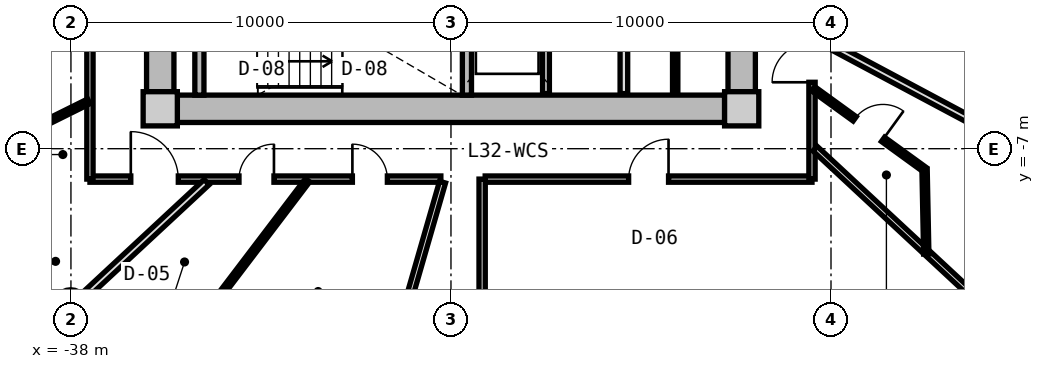
"""IFC4 building model, lengths in metres.
Left out: names, types, materials, properties, quantities, classifications, styles, units other than length and angle.
Written with IfcOpenShell. Run it as: python <this file> out.ifc"""

import sys

from ifc_helpers import new_model, si_unit, direction, frame, frame_2d, origin, origin_2d, place, context, subcontext, project, spatial, rectangle, extrude, source, transform, mapped, element, fill, save


model = new_model("IFC4")
c1 = context("Model", 3, precision=1e-05, world=origin(), true_north=direction((0.0, 1.0)))
c2 = subcontext(c1, "Body", "Model", "MODEL_VIEW")
j1 = project(units=[si_unit("LENGTHUNIT", "METRE"), si_unit("PLANEANGLEUNIT", "RADIAN")], contexts=[c1])
p1 = place(None, origin())
s1 = spatial("IfcSite", under=j1, at=p1, CompositionType="ELEMENT")
p2 = place(p1, origin())
s2 = spatial("IfcBuilding", under=s1, at=p2, CompositionType="ELEMENT")
p3 = place(p2, frame((0.0, 0.0, 105.4)))
s3 = spatial("IfcBuildingStorey", under=s2, at=p3, CompositionType="ELEMENT", Elevation=105.4)
m1 = source(origin(), c2, "Body", "SweptSolid", [
    extrude(rectangle(XDim=0.9, YDim=0.9, at=origin_2d()), origin(), (0.0, 0.0, 1.0), 3.05),
])
for number, where, z_axis, x_axis in (
    (1, (-35.65, -5.95, 0.0), (0.0, 0.0, 1.0), (1.0, 0.0, 0.0)),
    (2, (-20.35, -5.95, 0.0), (0.0, 0.0, 1.0), (1.0, 0.0, 0.0)),
):
    element("IfcColumn", number, at=place(p3, frame(where, z_axis=z_axis, x_axis=x_axis)), inside=s3, PredefinedType="COLUMN", context=c2, shape_type="MappedRepresentation", body=[
        mapped(m1, transform((0.0, 0.0, 0.0), x_axis=(1.0, 0.0, 0.0), y_axis=(0.0, 1.0, 0.0), z_axis=(0.0, 0.0, 1.0), scale=1.0)),
    ])
m2 = source(origin(), c2, "Body", "SweptSolid", [
    extrude(rectangle(XDim=14.4, YDim=0.72, at=frame_2d((7.2, 0.0))), origin(), (0.0, 0.0, 1.0), 2.79),
])
p4 = place(p3, frame((-20.8, -5.95, 0.0), z_axis=(0.0, 0.0, 1.0), x_axis=(-1.0, 0.0, 0.0)))
e3 = element("IfcWall", 3, at=p4, inside=s3, PredefinedType="SHEAR", context=c2, shape_type="MappedRepresentation", body=[
    mapped(m2, transform((0.0, 0.0, 0.0), x_axis=(1.0, 0.0, 0.0), y_axis=(0.0, 1.0, 0.0), z_axis=(0.0, 0.0, 1.0), scale=1.0)),
])
m3 = source(origin(), c2, "Body", "SweptSolid", [
    extrude(rectangle(XDim=11.0, YDim=0.72, at=frame_2d((5.5, 0.0))), origin(), (0.0, 0.0, 1.0), 2.79),
])
p5 = place(p3, frame((-35.65, -5.5, 0.0), z_axis=(0.0, 0.0, 1.0), x_axis=(0.0, 1.0, 0.0)))
e4 = element("IfcWall", 4, at=p5, inside=s3, PredefinedType="SHEAR", context=c2, shape_type="MappedRepresentation", body=[
    mapped(m3, transform((0.0, 0.0, 0.0), x_axis=(1.0, 0.0, 0.0), y_axis=(0.0, 1.0, 0.0), z_axis=(0.0, 0.0, 1.0), scale=1.0)),
])
p6 = place(p5, frame((3.8, 0.0, 0.0)))
e5 = element("IfcOpeningElement", 5, at=p6, cuts=e4, PredefinedType="OPENING", context=c2, shape_type="SweptSolid", body=[
    extrude(rectangle(XDim=1.2, YDim=2.15, at=frame_2d((0.6, 1.075))), frame((0.0, 0.37, 0.0), z_axis=(0.0, -1.0, 0.0), x_axis=(1.0, 0.0, 0.0)), (0.0, 0.0, 1.0), 0.74),
])
p7 = place(p3, frame((-20.35, 5.5, 0.0), z_axis=(0.0, 0.0, 1.0), x_axis=(0.0, -1.0, 0.0)))
e6 = element("IfcWall", 6, at=p7, inside=s3, PredefinedType="SHEAR", context=c2, shape_type="MappedRepresentation", body=[
    mapped(m3, transform((0.0, 0.0, 0.0), x_axis=(1.0, 0.0, 0.0), y_axis=(0.0, 1.0, 0.0), z_axis=(0.0, 0.0, 1.0), scale=1.0)),
])
p8 = place(p7, frame((5.65, 0.0, 0.0)))
e7 = element("IfcOpeningElement", 7, at=p8, cuts=e6, PredefinedType="OPENING", context=c2, shape_type="SweptSolid", body=[
    extrude(rectangle(XDim=1.2, YDim=2.15, at=frame_2d((0.6, 1.075))), frame((0.0, 0.37, 0.0), z_axis=(0.0, -1.0, 0.0), x_axis=(1.0, 0.0, 0.0)), (0.0, 0.0, 1.0), 0.74),
])
m4 = source(origin(), c2, "Body", "SweptSolid", [
    extrude(rectangle(XDim=3.14, YDim=0.24, at=frame_2d((1.57, 0.0))), origin(), (0.0, 0.0, 1.0), 2.79),
])
for number, where, z_axis, x_axis in (
    (8, (-34.62, -5.59, 0.0), (0.0, 0.0, 1.0), (0.0, 1.0, 0.0)),
    (9, (-27.58, -5.59, 0.0), (0.0, 0.0, 1.0), (0.0, 1.0, 0.0)),
):
    element("IfcWall", number, at=place(p3, frame(where, z_axis=z_axis, x_axis=x_axis)), inside=s3, PredefinedType="PARTITIONING", context=c2, shape_type="MappedRepresentation", body=[
        mapped(m4, transform((0.0, 0.0, 0.0), x_axis=(1.0, 0.0, 0.0), y_axis=(0.0, 1.0, 0.0), z_axis=(0.0, 0.0, 1.0), scale=1.0)),
    ])
m5 = source(origin(), c2, "Body", "SweptSolid", [
    extrude(rectangle(XDim=3.8, YDim=0.2, at=frame_2d((1.9, 0.0))), origin(), (0.0, 0.0, 1.0), 2.775),
])
p9 = place(p3, frame((-23.45, -5.55, 0.0), z_axis=(0.0, 0.0, 1.0), x_axis=(0.0, 1.0, 0.0)))
e10 = element("IfcWall", 10, at=p9, inside=s3, PredefinedType="PARTITIONING", context=c2, shape_type="MappedRepresentation", body=[
    mapped(m5, transform((0.0, 0.0, 0.0), x_axis=(1.0, 0.0, 0.0), y_axis=(0.0, 1.0, 0.0), z_axis=(0.0, 0.0, 1.0), scale=1.0)),
])
m6 = source(origin(), c2, "Body", "SweptSolid", [
    extrude(rectangle(XDim=3.22, YDim=0.18, at=frame_2d((1.61, 0.0))), origin(), (0.0, 0.0, 1.0), 2.775),
])
p10 = place(p3, frame((-25.5, -5.55, 0.0), z_axis=(0.0, 0.0, 1.0), x_axis=(0.0, 1.0, 0.0)))
e11 = element("IfcWall", 11, at=p10, inside=s3, PredefinedType="PARTITIONING", context=c2, shape_type="MappedRepresentation", body=[
    mapped(m6, transform((0.0, 0.0, 0.0), x_axis=(1.0, 0.0, 0.0), y_axis=(0.0, 1.0, 0.0), z_axis=(0.0, 0.0, 1.0), scale=1.0)),
])
m7 = source(origin(), c2, "Body", "SweptSolid", [
    extrude(rectangle(XDim=3.8, YDim=0.14, at=frame_2d((1.9, 0.0))), origin(), (0.0, 0.0, 1.0), 2.775),
])
p11 = place(p3, frame((-22.1, -5.55, 0.0), z_axis=(0.0, 0.0, 1.0), x_axis=(0.0, 1.0, 0.0)))
e12 = element("IfcWall", 12, at=p11, inside=s3, PredefinedType="PARTITIONING", context=c2, shape_type="MappedRepresentation", body=[
    mapped(m7, transform((0.0, 0.0, 0.0), x_axis=(1.0, 0.0, 0.0), y_axis=(0.0, 1.0, 0.0), z_axis=(0.0, 0.0, 1.0), scale=1.0)),
])
m8 = source(origin(), c2, "Body", "SweptSolid", [
    extrude(rectangle(XDim=8.6, YDim=0.165, at=frame_2d((4.3, 0.0))), origin(), (0.0, 0.0, 1.0), 2.775),
])
p12 = place(p3, frame((-18.5, -7.8, 0.0), z_axis=(0.0, 0.0, 1.0), x_axis=(-1.0, 0.0, 0.0)))
e13 = element("IfcWall", 13, at=p12, inside=s3, PredefinedType="PARTITIONING", context=c2, shape_type="MappedRepresentation", body=[
    mapped(m8, transform((0.0, 0.0, 0.0), x_axis=(1.0, 0.0, 0.0), y_axis=(0.0, 1.0, 0.0), z_axis=(0.0, 0.0, 1.0), scale=1.0)),
])
p13 = place(p12, frame((3.775, 0.0, 0.0)))
e14 = element("IfcOpeningElement", 14, at=p13, cuts=e13, PredefinedType="OPENING", context=c2, shape_type="SweptSolid", body=[
    extrude(rectangle(XDim=1.05, YDim=2.15, at=frame_2d((0.525, 1.075))), frame((0.0, 0.093, 0.0), z_axis=(0.0, -1.0, 0.0), x_axis=(1.0, 0.0, 0.0)), (0.0, 0.0, 1.0), 0.185),
])
m9 = source(origin(), c2, "Body", "SweptSolid", [
    extrude(rectangle(XDim=9.234, YDim=0.165, at=frame_2d((4.617, 0.0))), origin(), (0.0, 0.0, 1.0), 2.775),
])
p14 = place(p3, frame((-28.266, -7.8, 0.0), z_axis=(0.0, 0.0, 1.0), x_axis=(-1.0, 0.0, 0.0)))
e15 = element("IfcWall", 15, at=p14, inside=s3, PredefinedType="PARTITIONING", context=c2, shape_type="MappedRepresentation", body=[
    mapped(m9, transform((0.0, 0.0, 0.0), x_axis=(1.0, 0.0, 0.0), y_axis=(0.0, 1.0, 0.0), z_axis=(0.0, 0.0, 1.0), scale=1.0)),
])
p15 = place(p14, frame((6.909, 0.0, 0.0)))
e16 = element("IfcOpeningElement", 16, at=p15, cuts=e15, PredefinedType="OPENING", context=c2, shape_type="SweptSolid", body=[
    extrude(rectangle(XDim=1.25, YDim=2.2, at=frame_2d((0.625, 1.1))), frame((0.0, 0.093, 0.0), z_axis=(0.0, -1.0, 0.0), x_axis=(1.0, 0.0, 0.0)), (0.0, 0.0, 1.0), 0.185),
])
p16 = place(p14, frame((4.392, 0.0, 0.0)))
e17 = element("IfcOpeningElement", 17, at=p16, cuts=e15, PredefinedType="OPENING", context=c2, shape_type="SweptSolid", body=[
    extrude(rectangle(XDim=0.92, YDim=2.1, at=frame_2d((0.46, 1.05))), frame((0.0, 0.093, 0.0), z_axis=(0.0, -1.0, 0.0), x_axis=(1.0, 0.0, 0.0)), (0.0, 0.0, 1.0), 0.185),
])
p17 = place(p14, frame((1.408, 0.0, 0.0)))
e18 = element("IfcOpeningElement", 18, at=p17, cuts=e15, PredefinedType="OPENING", context=c2, shape_type="SweptSolid", body=[
    extrude(rectangle(XDim=0.92, YDim=2.1, at=frame_2d((0.46, 1.05))), frame((0.0, 0.093, 0.0), z_axis=(0.0, -1.0, 0.0), x_axis=(1.0, 0.0, 0.0)), (0.0, 0.0, 1.0), 0.185),
])
m10 = source(origin(), c2, "Body", "SweptSolid", [
    extrude(rectangle(XDim=15.6, YDim=0.165, at=frame_2d((7.8, 0.0))), origin(), (0.0, 0.0, 1.0), 2.775),
])
p18 = place(p3, frame((-37.5, -7.8, 0.0), z_axis=(0.0, 0.0, 1.0), x_axis=(0.0, 1.0, 0.0)))
e19 = element("IfcWall", 19, at=p18, inside=s3, PredefinedType="PARTITIONING", context=c2, shape_type="MappedRepresentation", body=[
    mapped(m10, transform((0.0, 0.0, 0.0), x_axis=(1.0, 0.0, 0.0), y_axis=(0.0, 1.0, 0.0), z_axis=(0.0, 0.0, 1.0), scale=1.0)),
])
p19 = place(p18, frame((11.994, 0.0, 0.0)))
e20 = element("IfcOpeningElement", 20, at=p19, cuts=e19, PredefinedType="OPENING", context=c2, shape_type="SweptSolid", body=[
    extrude(rectangle(XDim=1.25, YDim=2.2, at=frame_2d((0.625, 1.1))), frame((0.0, 0.093, 0.0), z_axis=(0.0, -1.0, 0.0), x_axis=(1.0, 0.0, 0.0)), (0.0, 0.0, 1.0), 0.185),
])
p20 = place(p18, frame((7.984, 0.0, 0.0)))
e21 = element("IfcOpeningElement", 21, at=p20, cuts=e19, PredefinedType="OPENING", context=c2, shape_type="SweptSolid", body=[
    extrude(rectangle(XDim=1.05, YDim=2.15, at=frame_2d((0.525, 1.075))), frame((0.0, 0.093, 0.0), z_axis=(0.0, -1.0, 0.0), x_axis=(1.0, 0.0, 0.0)), (0.0, 0.0, 1.0), 0.185),
])
p21 = place(p18, frame((5.777, 0.0, 0.0)))
e22 = element("IfcOpeningElement", 22, at=p21, cuts=e19, PredefinedType="OPENING", context=c2, shape_type="SweptSolid", body=[
    extrude(rectangle(XDim=1.05, YDim=2.15, at=frame_2d((0.525, 1.075))), frame((0.0, 0.093, 0.0), z_axis=(0.0, -1.0, 0.0), x_axis=(1.0, 0.0, 0.0)), (0.0, 0.0, 1.0), 0.185),
])
p22 = place(p3, frame((-18.5, 7.8, 0.0), z_axis=(0.0, 0.0, 1.0), x_axis=(0.0, -1.0, 0.0)))
e23 = element("IfcWall", 23, at=p22, inside=s3, PredefinedType="PARTITIONING", context=c2, shape_type="MappedRepresentation", body=[
    mapped(m10, transform((0.0, 0.0, 0.0), x_axis=(1.0, 0.0, 0.0), y_axis=(0.0, 1.0, 0.0), z_axis=(0.0, 0.0, 1.0), scale=1.0)),
])
p23 = place(p22, frame((12.002, 0.0, 0.0)))
e24 = element("IfcOpeningElement", 24, at=p23, cuts=e23, PredefinedType="OPENING", context=c2, shape_type="SweptSolid", body=[
    extrude(rectangle(XDim=1.05, YDim=2.15, at=frame_2d((0.525, 1.075))), frame((0.0, 0.093, 0.0), z_axis=(0.0, -1.0, 0.0), x_axis=(1.0, 0.0, 0.0)), (0.0, 0.0, 1.0), 0.185),
])
p24 = place(p22, frame((10.211, 0.0, 0.0)))
e25 = element("IfcOpeningElement", 25, at=p24, cuts=e23, PredefinedType="OPENING", context=c2, shape_type="SweptSolid", body=[
    extrude(rectangle(XDim=1.05, YDim=2.15, at=frame_2d((0.525, 1.075))), frame((0.0, 0.093, 0.0), z_axis=(0.0, -1.0, 0.0), x_axis=(1.0, 0.0, 0.0)), (0.0, 0.0, 1.0), 0.185),
])
p25 = place(p22, frame((7.722, 0.0, 0.0)))
e26 = element("IfcOpeningElement", 26, at=p25, cuts=e23, PredefinedType="OPENING", context=c2, shape_type="SweptSolid", body=[
    extrude(rectangle(XDim=1.05, YDim=2.15, at=frame_2d((0.525, 1.075))), frame((0.0, 0.093, 0.0), z_axis=(0.0, -1.0, 0.0), x_axis=(1.0, 0.0, 0.0)), (0.0, 0.0, 1.0), 0.185),
])
p26 = place(p22, frame((6.291, 0.0, 0.0)))
e27 = element("IfcOpeningElement", 27, at=p26, cuts=e23, PredefinedType="OPENING", context=c2, shape_type="SweptSolid", body=[
    extrude(rectangle(XDim=1.05, YDim=2.15, at=frame_2d((0.525, 1.075))), frame((0.0, 0.093, 0.0), z_axis=(0.0, -1.0, 0.0), x_axis=(1.0, 0.0, 0.0)), (0.0, 0.0, 1.0), 0.185),
])
p27 = place(p22, frame((2.465, 0.0, 0.0)))
e28 = element("IfcOpeningElement", 28, at=p27, cuts=e23, PredefinedType="OPENING", context=c2, shape_type="SweptSolid", body=[
    extrude(rectangle(XDim=1.25, YDim=2.2, at=frame_2d((0.625, 1.1))), frame((0.0, 0.093, 0.0), z_axis=(0.0, -1.0, 0.0), x_axis=(1.0, 0.0, 0.0)), (0.0, 0.0, 1.0), 0.185),
])
m11 = source(origin(), c2, "Body", "SweptSolid", [
    extrude(rectangle(XDim=8.989, YDim=0.165, at=frame_2d((4.495, 0.0))), origin(), (0.0, 0.0, 1.0), 2.275),
])
p28 = place(p3, frame((-28.222, -7.88, 0.0), z_axis=(0.0, 0.0, 1.0), x_axis=(-0.27702323008, -0.960863221274, 0.0)))
e29 = element("IfcWall", 29, at=p28, inside=s3, PredefinedType="PARTITIONING", context=c2, shape_type="MappedRepresentation", body=[
    mapped(m11, transform((0.0, 0.0, 0.0), x_axis=(1.0, 0.0, 0.0), y_axis=(0.0, 1.0, 0.0), z_axis=(0.0, 0.0, 1.0), scale=1.0)),
])
m12 = source(origin(), c2, "Body", "SweptSolid", [
    extrude(rectangle(XDim=7.482, YDim=0.165, at=frame_2d((3.741, 0.0))), origin(), (0.0, 0.0, 1.0), 2.275),
])
p29 = place(p3, frame((-18.42, -6.998, 0.0), z_axis=(0.0, 0.0, 1.0), x_axis=(0.732508698043, -0.680757671489, 0.0)))
e30 = element("IfcWall", 30, at=p29, inside=s3, PredefinedType="PARTITIONING", context=c2, shape_type="MappedRepresentation", body=[
    mapped(m12, transform((0.0, 0.0, 0.0), x_axis=(1.0, 0.0, 0.0), y_axis=(0.0, 1.0, 0.0), z_axis=(0.0, 0.0, 1.0), scale=1.0)),
])
m13 = source(origin(), c2, "Body", "SweptSolid", [
    extrude(rectangle(XDim=7.56, YDim=0.165, at=frame_2d((3.78, 0.0))), origin(), (0.0, 0.0, 1.0), 2.775),
])
p30 = place(p3, frame((-27.18, -15.36, 0.0), z_axis=(0.0, 0.0, 1.0), x_axis=(0.0, 1.0, 0.0)))
e31 = element("IfcWall", 31, at=p30, inside=s3, PredefinedType="PARTITIONING", context=c2, shape_type="MappedRepresentation", body=[
    mapped(m13, transform((0.0, 0.0, 0.0), x_axis=(1.0, 0.0, 0.0), y_axis=(0.0, 1.0, 0.0), z_axis=(0.0, 0.0, 1.0), scale=1.0)),
])
m14 = source(origin(), c2, "Body", "SweptSolid", [
    extrude(rectangle(XDim=6.331, YDim=0.19, at=frame_2d((3.165, 0.0))), origin(), (0.0, 0.0, 1.0), 2.275),
])
p31 = place(p3, frame((-37.58, -2.896, 0.0), z_axis=(0.0, 0.0, 1.0), x_axis=(-0.97036440661, -0.241646267062, 0.0)))
e32 = element("IfcWall", 32, at=p31, inside=s3, PredefinedType="PARTITIONING", context=c2, shape_type="MappedRepresentation", body=[
    mapped(m14, transform((0.0, 0.0, 0.0), x_axis=(1.0, 0.0, 0.0), y_axis=(0.0, 1.0, 0.0), z_axis=(0.0, 0.0, 1.0), scale=1.0)),
])
m15 = source(origin(), c2, "Body", "SweptSolid", [
    extrude(rectangle(XDim=6.187, YDim=0.19, at=frame_2d((3.093, 0.0))), origin(), (0.0, 0.0, 1.0), 2.415),
])
p32 = place(p3, frame((-34.429, -7.88, 0.0), z_axis=(0.0, 0.0, 1.0), x_axis=(-0.732501077882, -0.680765870841, 0.0)))
e33 = element("IfcWall", 33, at=p32, inside=s3, PredefinedType="PARTITIONING", context=c2, shape_type="MappedRepresentation", body=[
    mapped(m15, transform((0.0, 0.0, 0.0), x_axis=(1.0, 0.0, 0.0), y_axis=(0.0, 1.0, 0.0), z_axis=(0.0, 0.0, 1.0), scale=1.0)),
])
m16 = source(origin(), c2, "Body", "SweptSolid", [
    extrude(rectangle(XDim=2.469, YDim=0.14, at=frame_2d((1.235, 0.0))), origin(), (0.0, 0.0, 1.0), 2.775),
])
p33 = place(p3, frame((-37.53, -5.754, 0.0), z_axis=(0.0, 0.0, 1.0), x_axis=(-0.895512172456, -0.445037019789, 0.0)))
e34 = element("IfcWall", 34, at=p33, inside=s3, PredefinedType="PARTITIONING", context=c2, shape_type="MappedRepresentation", body=[
    mapped(m16, transform((0.0, 0.0, 0.0), x_axis=(1.0, 0.0, 0.0), y_axis=(0.0, 1.0, 0.0), z_axis=(0.0, 0.0, 1.0), scale=1.0)),
])
m17 = source(origin(), c2, "Body", "SweptSolid", [
    extrude(rectangle(XDim=7.243, YDim=0.14, at=frame_2d((3.621, 0.0))), origin(), (0.0, 0.0, 1.0), 2.775),
])
p34 = place(p3, frame((-31.774, -7.83, 0.0), z_axis=(0.0, 0.0, 1.0), x_axis=(-0.605111472002, -0.796140757939, 0.0)))
e35 = element("IfcWall", 35, at=p34, inside=s3, PredefinedType="PARTITIONING", context=c2, shape_type="MappedRepresentation", body=[
    mapped(m17, transform((0.0, 0.0, 0.0), x_axis=(1.0, 0.0, 0.0), y_axis=(0.0, 1.0, 0.0), z_axis=(0.0, 0.0, 1.0), scale=1.0)),
])
m18 = source(origin(), c2, "Body", "SweptSolid", [
    extrude(rectangle(XDim=10.556, YDim=0.19, at=frame_2d((5.278, 0.0))), origin(), (0.0, 0.0, 1.0), 2.275),
])
p35 = place(p3, frame((-18.42, -1.875, 0.0), z_axis=(0.0, 0.0, 1.0), x_axis=(0.970363857851, -0.241648470667, 0.0)))
e36 = element("IfcWall", 36, at=p35, inside=s3, PredefinedType="PARTITIONING", context=c2, shape_type="MappedRepresentation", body=[
    mapped(m18, transform((0.0, 0.0, 0.0), x_axis=(1.0, 0.0, 0.0), y_axis=(0.0, 1.0, 0.0), z_axis=(0.0, 0.0, 1.0), scale=1.0)),
])
m19 = source(origin(), c2, "Body", "SweptSolid", [
    extrude(rectangle(XDim=8.744, YDim=0.19, at=frame_2d((4.372, 0.0))), origin(), (0.0, 0.0, 1.0), 2.775),
])
p36 = place(p3, frame((-18.273, -4.142, 0.0), z_axis=(0.0, 0.0, 1.0), x_axis=(0.882252449936, -0.470776607938, 0.0)))
e37 = element("IfcWall", 37, at=p36, inside=s3, PredefinedType="PARTITIONING", context=c2, shape_type="MappedRepresentation", body=[
    mapped(m19, transform((0.0, 0.0, 0.0), x_axis=(1.0, 0.0, 0.0), y_axis=(0.0, 1.0, 0.0), z_axis=(0.0, 0.0, 1.0), scale=1.0)),
])
m20 = source(origin(), c2, "Body", "SweptSolid", [
    extrude(rectangle(XDim=3.621, YDim=0.14, at=frame_2d((1.811, 0.0))), origin(), (0.0, 0.0, 1.0), 2.775),
])
p37 = place(p3, frame((-18.47, -5.422, 0.0), z_axis=(0.0, 0.0, 1.0), x_axis=(0.80968252222, -0.586868139544, 0.0)))
e38 = element("IfcWall", 38, at=p37, inside=s3, PredefinedType="PARTITIONING", context=c2, shape_type="MappedRepresentation", body=[
    mapped(m20, transform((0.0, 0.0, 0.0), x_axis=(1.0, 0.0, 0.0), y_axis=(0.0, 1.0, 0.0), z_axis=(0.0, 0.0, 1.0), scale=1.0)),
])
p38 = place(p37, frame((1.351, 0.0, 0.0)))
e39 = element("IfcOpeningElement", 39, at=p38, cuts=e38, PredefinedType="OPENING", context=c2, shape_type="SweptSolid", body=[
    extrude(rectangle(XDim=0.92, YDim=2.1, at=frame_2d((0.46, 1.05))), frame((0.0, 0.08, 0.0), z_axis=(0.0, -1.0, 0.0), x_axis=(1.0, 0.0, 0.0)), (0.0, 0.0, 1.0), 0.16),
])
m21 = source(origin(), c2, "Body", "SweptSolid", [
    extrude(rectangle(XDim=2.225, YDim=0.14, at=frame_2d((1.112, 0.0))), origin(), (0.0, 0.0, 1.0), 2.775),
])
p39 = place(p3, frame((-15.538, -7.547, 0.0), z_axis=(0.0, 0.0, 1.0), x_axis=(0.019971869027, -0.999800542332, 0.0)))
e40 = element("IfcWall", 40, at=p39, inside=s3, PredefinedType="PARTITIONING", context=c2, shape_type="MappedRepresentation", body=[
    mapped(m21, transform((0.0, 0.0, 0.0), x_axis=(1.0, 0.0, 0.0), y_axis=(0.0, 1.0, 0.0), z_axis=(0.0, 0.0, 1.0), scale=1.0)),
])
m22 = source(origin(), c2, "Body", "SweptSolid", [
    extrude(rectangle(XDim=1.05, YDim=2.15, at=frame_2d((0.525, 1.075))), frame((0.0, 0.025, 0.0), z_axis=(0.0, -1.0, 0.0), x_axis=(1.0, 0.0, 0.0)), (0.0, 0.0, 1.0), 0.05),
])
p40 = place(p13, frame((1.05, 0.0, 0.0), z_axis=(0.0, 0.0, 1.0), x_axis=(-1.0, 0.0, 0.0)))
e41 = element("IfcDoor", 41, at=p40, inside=s3, OperationType="SINGLE_SWING_RIGHT", PredefinedType="DOOR", context=c2, shape_type="MappedRepresentation", body=[
    mapped(m22, transform((0.0, 0.0, 0.0), x_axis=(1.0, 0.0, 0.0), y_axis=(0.0, 1.0, 0.0), z_axis=(0.0, 0.0, 1.0), scale=1.0)),
])
fill(e14, e41)
m23 = source(origin(), c2, "Body", "SweptSolid", [
    extrude(rectangle(XDim=1.25, YDim=2.2, at=frame_2d((0.625, 1.1))), frame((0.0, 0.025, 0.0), z_axis=(0.0, -1.0, 0.0), x_axis=(1.0, 0.0, 0.0)), (0.0, 0.0, 1.0), 0.05),
])
p41 = place(p15, frame((1.25, 0.0, 0.0), z_axis=(0.0, 0.0, 1.0), x_axis=(-1.0, 0.0, 0.0)))
e42 = element("IfcDoor", 42, at=p41, inside=s3, OperationType="SINGLE_SWING_LEFT", PredefinedType="DOOR", context=c2, shape_type="MappedRepresentation", body=[
    mapped(m23, transform((0.0, 0.0, 0.0), x_axis=(1.0, 0.0, 0.0), y_axis=(0.0, 1.0, 0.0), z_axis=(0.0, 0.0, 1.0), scale=1.0)),
])
fill(e16, e42)
m24 = source(origin(), c2, "Body", "SweptSolid", [
    extrude(rectangle(XDim=0.92, YDim=2.1, at=frame_2d((0.46, 1.05))), frame((0.0, 0.025, 0.0), z_axis=(0.0, -1.0, 0.0), x_axis=(1.0, 0.0, 0.0)), (0.0, 0.0, 1.0), 0.05),
])
p42 = place(p16, frame((0.92, 0.0, 0.0), z_axis=(0.0, 0.0, 1.0), x_axis=(-1.0, 0.0, 0.0)))
e43 = element("IfcDoor", 43, at=p42, inside=s3, OperationType="SINGLE_SWING_RIGHT", PredefinedType="DOOR", context=c2, shape_type="MappedRepresentation", body=[
    mapped(m24, transform((0.0, 0.0, 0.0), x_axis=(1.0, 0.0, 0.0), y_axis=(0.0, 1.0, 0.0), z_axis=(0.0, 0.0, 1.0), scale=1.0)),
])
fill(e17, e43)
p43 = place(p17, frame((0.92, 0.0, 0.0), z_axis=(0.0, 0.0, 1.0), x_axis=(-1.0, 0.0, 0.0)))
e44 = element("IfcDoor", 44, at=p43, inside=s3, OperationType="SINGLE_SWING_LEFT", PredefinedType="DOOR", context=c2, shape_type="MappedRepresentation", body=[
    mapped(m24, transform((0.0, 0.0, 0.0), x_axis=(1.0, 0.0, 0.0), y_axis=(0.0, 1.0, 0.0), z_axis=(0.0, 0.0, 1.0), scale=1.0)),
])
fill(e18, e44)
p44 = place(p23, frame((1.05, 0.0, 0.0), z_axis=(0.0, 0.0, 1.0), x_axis=(-1.0, 0.0, 0.0)))
e45 = element("IfcDoor", 45, at=p44, inside=s3, OperationType="SINGLE_SWING_LEFT", PredefinedType="DOOR", context=c2, shape_type="MappedRepresentation", body=[
    mapped(m22, transform((0.0, 0.0, 0.0), x_axis=(1.0, 0.0, 0.0), y_axis=(0.0, 1.0, 0.0), z_axis=(0.0, 0.0, 1.0), scale=1.0)),
])
fill(e24, e45)
p45 = place(p38, origin())
e46 = element("IfcDoor", 46, at=p45, inside=s3, OperationType="SINGLE_SWING_RIGHT", PredefinedType="DOOR", context=c2, shape_type="MappedRepresentation", body=[
    mapped(m24, transform((0.0, 0.0, 0.0), x_axis=(1.0, 0.0, 0.0), y_axis=(0.0, 1.0, 0.0), z_axis=(0.0, 0.0, 1.0), scale=1.0)),
])
fill(e39, e46)
save(model, sys.argv[1])
